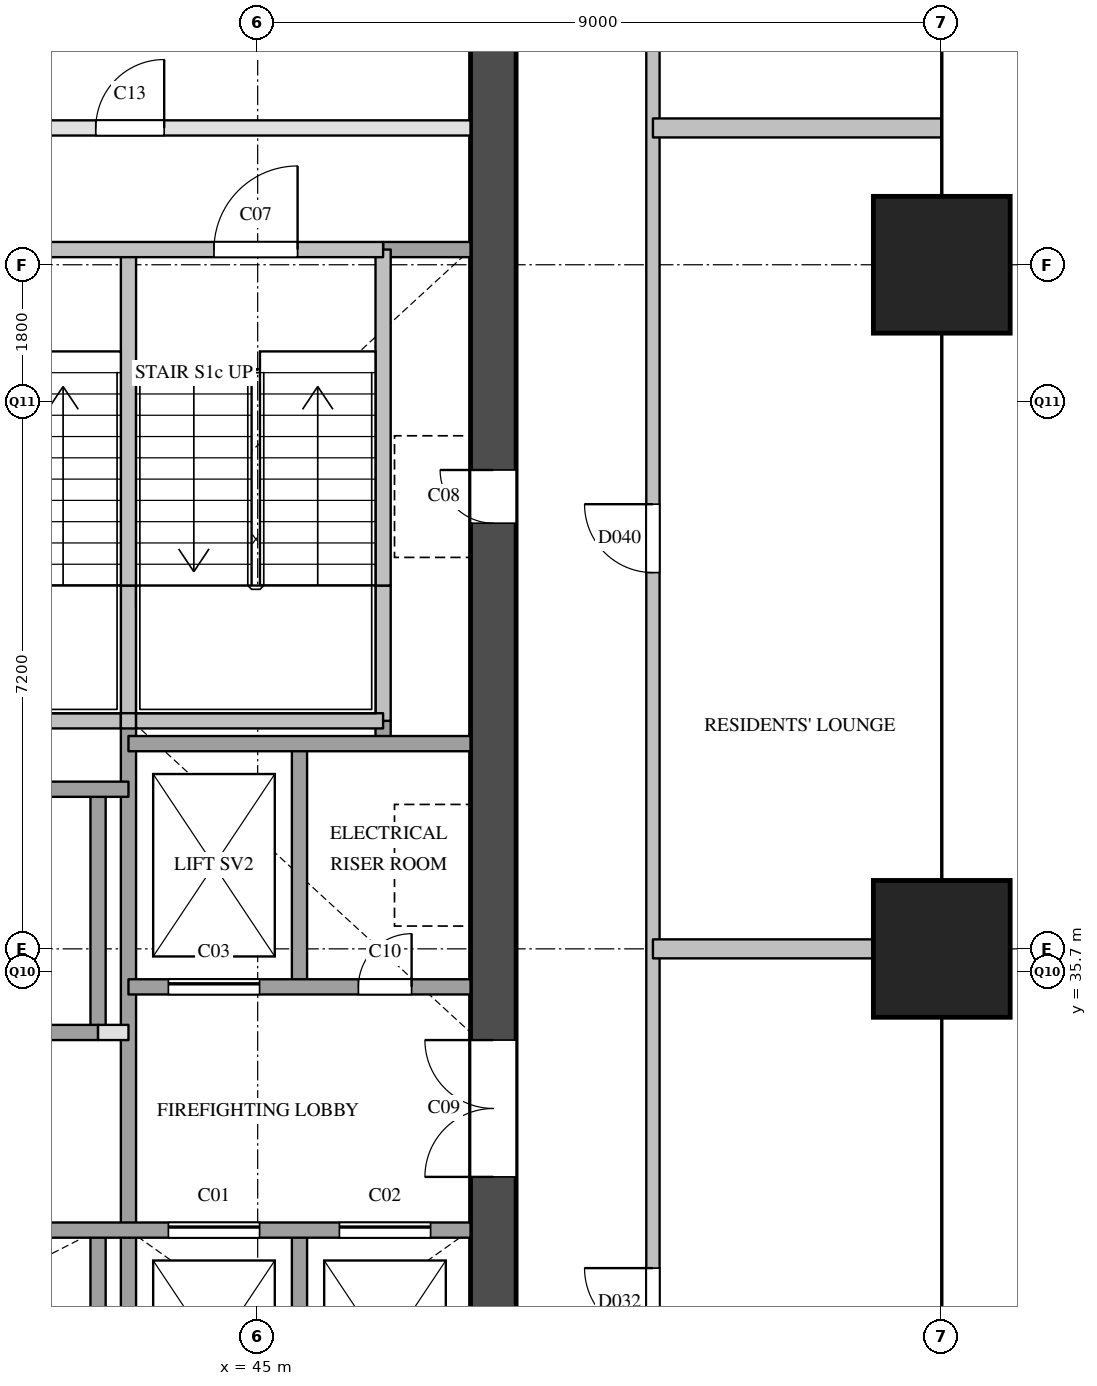
"""IFC4 building model, lengths in metres.
Left out: names, types, materials, properties, quantities, classifications, styles, units other than length and angle.
Written with IfcOpenShell. Run it as: python <this file> out.ifc"""

import sys

from ifc_helpers import new_model, si_unit, direction, frame, frame_2d, origin, origin_2d, place, context, subcontext, project, spatial, rectangle, extrude, element, fill, save


model = new_model("IFC4")
c1 = context("Model", 3, precision=1e-05, world=origin(), true_north=direction((0.0, 1.0)))
c2 = subcontext(c1, "Body", "Model", "MODEL_VIEW")
j1 = project(units=[si_unit("LENGTHUNIT", "METRE"), si_unit("PLANEANGLEUNIT", "RADIAN")], contexts=[c1])
p1 = place(None, origin())
s1 = spatial("IfcSite", under=j1, at=p1, CompositionType="ELEMENT")
p2 = place(p1, origin())
s2 = spatial("IfcBuilding", under=s1, at=p2, CompositionType="ELEMENT")
p3 = place(p2, frame((0.0, 0.0, 57.6)))
s3 = spatial("IfcBuildingStorey", under=s2, at=p3, CompositionType="ELEMENT", Elevation=57.6)
for number, where, z_axis, x_axis in (
    (1, (54.0, 36.0, 0.0), (0.0, 0.0, 1.0), (1.0, 0.0, 0.0)),
    (2, (54.0, 45.0, 0.0), (0.0, 0.0, 1.0), (1.0, 0.0, 0.0)),
):
    element("IfcColumn", number, at=place(p3, frame(where, z_axis=z_axis, x_axis=x_axis)), inside=s3, PredefinedType="COLUMN", context=c2, shape_type="SweptSolid", body=[
        extrude(rectangle(XDim=1.8, YDim=1.8, at=origin_2d()), origin(), (0.0, 0.0, 1.0), 3.8),
    ])
p4 = place(p3, frame((48.1, 29.1, 0.0), z_axis=(0.0, 0.0, 1.0), x_axis=(0.0, 1.0, 0.0)))
e3 = element("IfcWall", 3, at=p4, inside=s3, PredefinedType="SHEAR", context=c2, shape_type="SweptSolid", body=[
    extrude(rectangle(XDim=20.3, YDim=0.6, at=frame_2d((10.15, 0.0))), origin(), (0.0, 0.0, 1.0), 3.5),
])
p5 = place(p4, frame((12.5, 0.0, 0.0)))
e4 = element("IfcOpeningElement", 4, at=p5, cuts=e3, PredefinedType="OPENING", context=c2, shape_type="SweptSolid", body=[
    extrude(rectangle(XDim=0.7, YDim=2.1, at=frame_2d((0.35, 1.05))), frame((0.0, 0.31, 0.0), z_axis=(0.0, -1.0, 0.0), x_axis=(1.0, 0.0, 0.0)), (0.0, 0.0, 1.0), 0.62),
])
p6 = place(p4, frame((3.9, 0.0, 0.0)))
e5 = element("IfcOpeningElement", 5, at=p6, cuts=e3, PredefinedType="OPENING", context=c2, shape_type="SweptSolid", body=[
    extrude(rectangle(XDim=1.8, YDim=2.1, at=frame_2d((0.9, 1.05))), frame((0.0, 0.31, 0.0), z_axis=(0.0, -1.0, 0.0), x_axis=(1.0, 0.0, 0.0)), (0.0, 0.0, 1.0), 0.62),
])
p7 = place(p3, frame((42.9, 29.1, 0.0), z_axis=(0.0, 0.0, 1.0), x_axis=(0.0, 1.0, 0.0)))
e6 = element("IfcWall", 6, at=p7, inside=s3, PredefinedType="SOLIDWALL", context=c2, shape_type="SweptSolid", body=[
    extrude(rectangle(XDim=3.2, YDim=0.2, at=frame_2d((1.6, 0.0))), origin(), (0.0, 0.0, 1.0), 3.5),
])
p8 = place(p3, frame((42.9, 34.9, 0.0), z_axis=(0.0, 0.0, 1.0), x_axis=(0.0, 1.0, 0.0)))
e7 = element("IfcWall", 7, at=p8, inside=s3, PredefinedType="SOLIDWALL", context=c2, shape_type="SweptSolid", body=[
    extrude(rectangle(XDim=3.2, YDim=0.2, at=frame_2d((1.6, 0.0))), origin(), (0.0, 0.0, 1.0), 3.5),
])
p9 = place(p3, frame((43.3, 29.1, 0.0), z_axis=(0.0, 0.0, 1.0), x_axis=(0.0, 1.0, 0.0)))
e8 = element("IfcWall", 8, at=p9, inside=s3, PredefinedType="SOLIDWALL", context=c2, shape_type="SweptSolid", body=[
    extrude(rectangle(XDim=9.9, YDim=0.2, at=frame_2d((4.95, 0.0))), origin(), (0.0, 0.0, 1.0), 3.5),
])
p10 = place(p3, frame((43.3, 39.0, 0.0), z_axis=(0.0, 0.0, 1.0), x_axis=(0.0, 1.0, 0.0)))
e9 = element("IfcWall", 9, at=p10, inside=s3, PredefinedType="SOLIDWALL", context=c2, shape_type="SweptSolid", body=[
    extrude(rectangle(XDim=1.78, YDim=0.2, at=frame_2d((0.89, 0.0))), origin(), (0.0, 0.0, 1.0), 3.5),
])
p11 = place(p3, frame((43.3, 40.78, 0.0), z_axis=(0.0, 0.0, 1.0), x_axis=(0.0, 1.0, 0.0)))
e10 = element("IfcWall", 10, at=p11, inside=s3, PredefinedType="SOLIDWALL", context=c2, shape_type="SweptSolid", body=[
    extrude(rectangle(XDim=4.42, YDim=0.2, at=frame_2d((2.21, 0.0))), origin(), (0.0, 0.0, 1.0), 3.5),
])
for number, where, z_axis, x_axis in (
    (11, (45.55, 29.1, 0.0), (0.0, 0.0, 1.0), (0.0, 1.0, 0.0)),
    (12, (45.55, 35.5, 0.0), (0.0, 0.0, 1.0), (0.0, 1.0, 0.0)),
):
    element("IfcWall", number, at=place(p3, frame(where, z_axis=z_axis, x_axis=x_axis)), inside=s3, PredefinedType="SOLIDWALL", context=c2, shape_type="SweptSolid", body=[
        extrude(rectangle(XDim=3.2, YDim=0.2, at=frame_2d((1.6, 0.0))), origin(), (0.0, 0.0, 1.0), 3.5),
    ])
p12 = place(p3, frame((46.65, 38.7, 0.0), z_axis=(0.0, 0.0, 1.0), x_axis=(0.0, 1.0, 0.0)))
e13 = element("IfcWall", 13, at=p12, inside=s3, PredefinedType="SOLIDWALL", context=c2, shape_type="SweptSolid", body=[
    extrude(rectangle(XDim=0.3, YDim=0.2, at=frame_2d((0.15, 0.0))), origin(), (0.0, 0.0, 1.0), 3.5),
])
p13 = place(p3, frame((46.65, 39.0, 0.0), z_axis=(0.0, 0.0, 1.0), x_axis=(0.0, 1.0, 0.0)))
e14 = element("IfcWall", 14, at=p13, inside=s3, PredefinedType="SOLIDWALL", context=c2, shape_type="SweptSolid", body=[
    extrude(rectangle(XDim=1.78, YDim=0.2, at=frame_2d((0.89, 0.0))), origin(), (0.0, 0.0, 1.0), 3.5),
])
p14 = place(p3, frame((46.65, 40.78, 0.0), z_axis=(0.0, 0.0, 1.0), x_axis=(0.0, 1.0, 0.0)))
e15 = element("IfcWall", 15, at=p14, inside=s3, PredefinedType="SOLIDWALL", context=c2, shape_type="SweptSolid", body=[
    extrude(rectangle(XDim=4.42, YDim=0.2, at=frame_2d((2.21, 0.0))), origin(), (0.0, 0.0, 1.0), 3.5),
])
p15 = place(p3, frame((36.6, 32.3, 0.0), z_axis=(0.0, 0.0, 1.0), x_axis=(1.0, 0.0, 0.0)))
e16 = element("IfcWall", 16, at=p15, inside=s3, PredefinedType="SOLIDWALL", context=c2, shape_type="SweptSolid", body=[
    extrude(rectangle(XDim=11.2, YDim=0.2, at=frame_2d((5.6, 0.0))), origin(), (0.0, 0.0, 1.0), 3.5),
])
p16 = place(p15, frame((7.225, 0.0, 0.0)))
e17 = element("IfcOpeningElement", 17, at=p16, cuts=e16, PredefinedType="OPENING", context=c2, shape_type="SweptSolid", body=[
    extrude(rectangle(XDim=1.2, YDim=2.1, at=frame_2d((0.6, 1.05))), frame((0.0, 0.11, 0.0), z_axis=(0.0, -1.0, 0.0), x_axis=(1.0, 0.0, 0.0)), (0.0, 0.0, 1.0), 0.22),
])
p17 = place(p15, frame((9.475, 0.0, 0.0)))
e18 = element("IfcOpeningElement", 18, at=p17, cuts=e16, PredefinedType="OPENING", context=c2, shape_type="SweptSolid", body=[
    extrude(rectangle(XDim=1.2, YDim=2.1, at=frame_2d((0.6, 1.05))), frame((0.0, 0.11, 0.0), z_axis=(0.0, -1.0, 0.0), x_axis=(1.0, 0.0, 0.0)), (0.0, 0.0, 1.0), 0.22),
])
p18 = place(p3, frame((42.9, 34.9, 0.0), z_axis=(0.0, 0.0, 1.0), x_axis=(1.0, 0.0, 0.0)))
e19 = element("IfcWall", 19, at=p18, inside=s3, PredefinedType="PARTITIONING", context=c2, shape_type="SweptSolid", body=[
    extrude(rectangle(XDim=0.4, YDim=0.2, at=frame_2d((0.2, 0.0))), origin(), (0.0, 0.0, 1.0), 3.5),
])
p19 = place(p3, frame((36.6, 34.9, 0.0), z_axis=(0.0, 0.0, 1.0), x_axis=(1.0, 0.0, 0.0)))
e20 = element("IfcWall", 20, at=p19, inside=s3, PredefinedType="SOLIDWALL", context=c2, shape_type="SweptSolid", body=[
    extrude(rectangle(XDim=6.3, YDim=0.2, at=frame_2d((3.15, 0.0))), origin(), (0.0, 0.0, 1.0), 3.5),
])
p20 = place(p3, frame((43.3, 35.5, 0.0), z_axis=(0.0, 0.0, 1.0), x_axis=(1.0, 0.0, 0.0)))
e21 = element("IfcWall", 21, at=p20, inside=s3, PredefinedType="SOLIDWALL", context=c2, shape_type="SweptSolid", body=[
    extrude(rectangle(XDim=4.5, YDim=0.2, at=frame_2d((2.25, 0.0))), origin(), (0.0, 0.0, 1.0), 3.5),
])
p21 = place(p20, frame((0.525, 0.0, 0.0)))
e22 = element("IfcOpeningElement", 22, at=p21, cuts=e21, PredefinedType="OPENING", context=c2, shape_type="SweptSolid", body=[
    extrude(rectangle(XDim=1.2, YDim=2.1, at=frame_2d((0.6, 1.05))), frame((0.0, 0.11, 0.0), z_axis=(0.0, -1.0, 0.0), x_axis=(1.0, 0.0, 0.0)), (0.0, 0.0, 1.0), 0.22),
])
p22 = place(p20, frame((3.025, 0.0, 0.0)))
e23 = element("IfcOpeningElement", 23, at=p22, cuts=e21, PredefinedType="OPENING", context=c2, shape_type="SweptSolid", body=[
    extrude(rectangle(XDim=0.7, YDim=2.1, at=frame_2d((0.35, 1.05))), frame((0.0, 0.11, 0.0), z_axis=(0.0, -1.0, 0.0), x_axis=(1.0, 0.0, 0.0)), (0.0, 0.0, 1.0), 0.22),
])
p23 = place(p3, frame((36.6, 38.1, 0.0), z_axis=(0.0, 0.0, 1.0), x_axis=(1.0, 0.0, 0.0)))
e24 = element("IfcWall", 24, at=p23, inside=s3, PredefinedType="SOLIDWALL", context=c2, shape_type="SweptSolid", body=[
    extrude(rectangle(XDim=6.7, YDim=0.2, at=frame_2d((3.35, 0.0))), origin(), (0.0, 0.0, 1.0), 3.5),
])
p24 = place(p3, frame((43.3, 38.7, 0.0), z_axis=(0.0, 0.0, 1.0), x_axis=(1.0, 0.0, 0.0)))
e25 = element("IfcWall", 25, at=p24, inside=s3, PredefinedType="SOLIDWALL", context=c2, shape_type="SweptSolid", body=[
    extrude(rectangle(XDim=4.5, YDim=0.2, at=frame_2d((2.25, 0.0))), origin(), (0.0, 0.0, 1.0), 3.5),
])
p25 = place(p3, frame((40.05, 39.0, 0.0), z_axis=(0.0, 0.0, 1.0), x_axis=(1.0, 0.0, 0.0)))
e26 = element("IfcWall", 26, at=p25, inside=s3, PredefinedType="SOLIDWALL", context=c2, shape_type="SweptSolid", body=[
    extrude(rectangle(XDim=3.15, YDim=0.2, at=frame_2d((1.575, 0.0))), origin(), (0.0, 0.0, 1.0), 3.5),
])
p26 = place(p3, frame((43.2, 39.0, 0.0), z_axis=(0.0, 0.0, 1.0), x_axis=(1.0, 0.0, 0.0)))
e27 = element("IfcWall", 27, at=p26, inside=s3, PredefinedType="SOLIDWALL", context=c2, shape_type="SweptSolid", body=[
    extrude(rectangle(XDim=0.2, YDim=0.2, at=frame_2d((0.1, 0.0))), origin(), (0.0, 0.0, 1.0), 3.5),
])
p27 = place(p3, frame((43.4, 39.0, 0.0), z_axis=(0.0, 0.0, 1.0), x_axis=(1.0, 0.0, 0.0)))
e28 = element("IfcWall", 28, at=p27, inside=s3, PredefinedType="SOLIDWALL", context=c2, shape_type="SweptSolid", body=[
    extrude(rectangle(XDim=3.25, YDim=0.2, at=frame_2d((1.625, 0.0))), origin(), (0.0, 0.0, 1.0), 3.5),
])
p28 = place(p3, frame((46.65, 45.2, 0.0), z_axis=(0.0, 0.0, 1.0), x_axis=(1.0, 0.0, 0.0)))
e29 = element("IfcWall", 29, at=p28, inside=s3, PredefinedType="SOLIDWALL", context=c2, shape_type="SweptSolid", body=[
    extrude(rectangle(XDim=1.15, YDim=0.2, at=frame_2d((0.575, 0.0))), origin(), (0.0, 0.0, 1.0), 3.5),
])
p29 = place(p3, frame((36.6, 45.2, 0.0), z_axis=(0.0, 0.0, 1.0), x_axis=(1.0, 0.0, 0.0)))
e30 = element("IfcWall", 30, at=p29, inside=s3, PredefinedType="SOLIDWALL", context=c2, shape_type="SweptSolid", body=[
    extrude(rectangle(XDim=10.05, YDim=0.2, at=frame_2d((5.025, 0.0))), origin(), (0.0, 0.0, 1.0), 3.5),
])
p30 = place(p29, frame((1.125, 0.0, 0.0)))
e31 = element("IfcOpeningElement", 31, at=p30, cuts=e30, PredefinedType="OPENING", context=c2, shape_type="SweptSolid", body=[
    extrude(rectangle(XDim=1.1, YDim=2.1, at=frame_2d((0.55, 1.05))), frame((0.0, 0.11, 0.0), z_axis=(0.0, -1.0, 0.0), x_axis=(1.0, 0.0, 0.0)), (0.0, 0.0, 1.0), 0.22),
])
p31 = place(p29, frame((4.475, 0.0, 0.0)))
e32 = element("IfcOpeningElement", 32, at=p31, cuts=e30, PredefinedType="OPENING", context=c2, shape_type="SweptSolid", body=[
    extrude(rectangle(XDim=1.1, YDim=2.1, at=frame_2d((0.55, 1.05))), frame((0.0, 0.11, 0.0), z_axis=(0.0, -1.0, 0.0), x_axis=(1.0, 0.0, 0.0)), (0.0, 0.0, 1.0), 0.22),
])
p32 = place(p29, frame((7.825, 0.0, 0.0)))
e33 = element("IfcOpeningElement", 33, at=p32, cuts=e30, PredefinedType="OPENING", context=c2, shape_type="SweptSolid", body=[
    extrude(rectangle(XDim=1.1, YDim=2.1, at=frame_2d((0.55, 1.05))), frame((0.0, 0.11, 0.0), z_axis=(0.0, -1.0, 0.0), x_axis=(1.0, 0.0, 0.0)), (0.0, 0.0, 1.0), 0.22),
])
p33 = place(p3, frame((36.6, 46.8, 0.0), z_axis=(0.0, 0.0, 1.0), x_axis=(1.0, 0.0, 0.0)))
e34 = element("IfcWall", 34, at=p33, inside=s3, PredefinedType="PARTITIONING", context=c2, shape_type="SweptSolid", body=[
    extrude(rectangle(XDim=11.2, YDim=0.2, at=frame_2d((5.6, 0.0))), origin(), (0.0, 0.0, 1.0), 3.5),
])
p34 = place(p33, frame((0.67, 0.0, 0.0)))
e35 = element("IfcOpeningElement", 35, at=p34, cuts=e34, PredefinedType="OPENING", context=c2, shape_type="SweptSolid", body=[
    extrude(rectangle(XDim=0.9, YDim=2.1, at=frame_2d((0.45, 1.05))), frame((0.0, 0.11, 0.0), z_axis=(0.0, -1.0, 0.0), x_axis=(1.0, 0.0, 0.0)), (0.0, 0.0, 1.0), 0.22),
])
p35 = place(p33, frame((6.27, 0.0, 0.0)))
e36 = element("IfcOpeningElement", 36, at=p35, cuts=e34, PredefinedType="OPENING", context=c2, shape_type="SweptSolid", body=[
    extrude(rectangle(XDim=0.9, YDim=2.1, at=frame_2d((0.45, 1.05))), frame((0.0, 0.11, 0.0), z_axis=(0.0, -1.0, 0.0), x_axis=(1.0, 0.0, 0.0)), (0.0, 0.0, 1.0), 0.22),
])
p36 = place(p3, frame((50.2, 26.7, 0.0), z_axis=(0.0, 0.0, 1.0), x_axis=(0.0, 1.0, 0.0)))
e37 = element("IfcWall", 37, at=p36, inside=s3, PredefinedType="PARTITIONING", context=c2, shape_type="SweptSolid", body=[
    extrude(rectangle(XDim=25.1, YDim=0.175, at=frame_2d((12.55, 0.0))), origin(), (0.0, 0.0, 1.0), 2.5),
])
p37 = place(p36, frame((4.2, 0.0, 0.0)))
e38 = element("IfcOpeningElement", 38, at=p37, cuts=e37, PredefinedType="OPENING", context=c2, shape_type="SweptSolid", body=[
    extrude(rectangle(XDim=0.9, YDim=2.1, at=frame_2d((0.45, 1.05))), frame((0.0, 0.097, 0.0), z_axis=(0.0, -1.0, 0.0), x_axis=(1.0, 0.0, 0.0)), (0.0, 0.0, 1.0), 0.195),
])
p38 = place(p36, frame((14.25, 0.0, 0.0)))
e39 = element("IfcOpeningElement", 39, at=p38, cuts=e37, PredefinedType="OPENING", context=c2, shape_type="SweptSolid", body=[
    extrude(rectangle(XDim=0.9, YDim=2.1, at=frame_2d((0.45, 1.05))), frame((0.0, 0.097, 0.0), z_axis=(0.0, -1.0, 0.0), x_axis=(1.0, 0.0, 0.0)), (0.0, 0.0, 1.0), 0.195),
])
p39 = place(p36, frame((22.15, 0.0, 0.0)))
e40 = element("IfcOpeningElement", 40, at=p39, cuts=e37, PredefinedType="OPENING", context=c2, shape_type="SweptSolid", body=[
    extrude(rectangle(XDim=0.9, YDim=2.1, at=frame_2d((0.45, 1.05))), frame((0.0, 0.097, 0.0), z_axis=(0.0, -1.0, 0.0), x_axis=(1.0, 0.0, 0.0)), (0.0, 0.0, 1.0), 0.195),
])
p40 = place(p3, frame((50.2, 36.0, 0.0), z_axis=(0.0, 0.0, 1.0), x_axis=(1.0, 0.0, 0.0)))
e41 = element("IfcWall", 41, at=p40, inside=s3, PredefinedType="PARTITIONING", context=c2, shape_type="SweptSolid", body=[
    extrude(rectangle(XDim=3.8, YDim=0.25, at=frame_2d((1.9, 0.0))), origin(), (0.0, 0.0, 1.0), 3.5),
])
p41 = place(p3, frame((50.2, 46.8, 0.0), z_axis=(0.0, 0.0, 1.0), x_axis=(1.0, 0.0, 0.0)))
e42 = element("IfcWall", 42, at=p41, inside=s3, PredefinedType="PARTITIONING", context=c2, shape_type="SweptSolid", body=[
    extrude(rectangle(XDim=3.8, YDim=0.25, at=frame_2d((1.9, 0.0))), origin(), (0.0, 0.0, 1.0), 2.5),
])
p42 = place(p16, origin())
e43 = element("IfcDoor", 43, at=p42, inside=s3, OperationType="SLIDING_TO_LEFT", PredefinedType="DOOR", context=c2, shape_type="SweptSolid", body=[
    extrude(rectangle(XDim=1.2, YDim=2.1, at=frame_2d((0.6, 1.05))), frame((0.0, 0.025, 0.0), z_axis=(0.0, -1.0, 0.0), x_axis=(1.0, 0.0, 0.0)), (0.0, 0.0, 1.0), 0.05),
])
fill(e17, e43)
p43 = place(p17, origin())
e44 = element("IfcDoor", 44, at=p43, inside=s3, OperationType="SLIDING_TO_LEFT", PredefinedType="DOOR", context=c2, shape_type="SweptSolid", body=[
    extrude(rectangle(XDim=1.2, YDim=2.1, at=frame_2d((0.6, 1.05))), frame((0.0, 0.025, 0.0), z_axis=(0.0, -1.0, 0.0), x_axis=(1.0, 0.0, 0.0)), (0.0, 0.0, 1.0), 0.05),
])
fill(e18, e44)
p44 = place(p21, origin())
e45 = element("IfcDoor", 45, at=p44, inside=s3, OperationType="SLIDING_TO_LEFT", PredefinedType="DOOR", context=c2, shape_type="SweptSolid", body=[
    extrude(rectangle(XDim=1.2, YDim=2.1, at=frame_2d((0.6, 1.05))), frame((0.0, 0.025, 0.0), z_axis=(0.0, -1.0, 0.0), x_axis=(1.0, 0.0, 0.0)), (0.0, 0.0, 1.0), 0.05),
])
fill(e22, e45)
p45 = place(p32, origin())
e46 = element("IfcDoor", 46, at=p45, inside=s3, OperationType="SINGLE_SWING_RIGHT", PredefinedType="DOOR", context=c2, shape_type="SweptSolid", body=[
    extrude(rectangle(XDim=1.1, YDim=2.1, at=frame_2d((0.55, 1.05))), frame((0.0, 0.025, 0.0), z_axis=(0.0, -1.0, 0.0), x_axis=(1.0, 0.0, 0.0)), (0.0, 0.0, 1.0), 0.05),
])
fill(e33, e46)
p46 = place(p5, origin())
e47 = element("IfcDoor", 47, at=p46, inside=s3, OperationType="SINGLE_SWING_RIGHT", PredefinedType="DOOR", context=c2, shape_type="SweptSolid", body=[
    extrude(rectangle(XDim=0.7, YDim=2.1, at=frame_2d((0.35, 1.05))), frame((0.0, 0.025, 0.0), z_axis=(0.0, -1.0, 0.0), x_axis=(1.0, 0.0, 0.0)), (0.0, 0.0, 1.0), 0.05),
])
fill(e4, e47)
p47 = place(p6, origin())
e48 = element("IfcDoor", 48, at=p47, inside=s3, OperationType="DOUBLE_DOOR_SINGLE_SWING", PredefinedType="DOOR", context=c2, shape_type="SweptSolid", body=[
    extrude(rectangle(XDim=1.8, YDim=2.1, at=frame_2d((0.9, 1.05))), frame((0.0, 0.025, 0.0), z_axis=(0.0, -1.0, 0.0), x_axis=(1.0, 0.0, 0.0)), (0.0, 0.0, 1.0), 0.05),
])
fill(e5, e48)
p48 = place(p22, origin())
e49 = element("IfcDoor", 49, at=p48, inside=s3, OperationType="SINGLE_SWING_RIGHT", PredefinedType="DOOR", context=c2, shape_type="SweptSolid", body=[
    extrude(rectangle(XDim=0.7, YDim=2.1, at=frame_2d((0.35, 1.05))), frame((0.0, 0.025, 0.0), z_axis=(0.0, -1.0, 0.0), x_axis=(1.0, 0.0, 0.0)), (0.0, 0.0, 1.0), 0.05),
])
fill(e23, e49)
p49 = place(p35, origin())
e50 = element("IfcDoor", 50, at=p49, inside=s3, OperationType="SINGLE_SWING_RIGHT", PredefinedType="DOOR", context=c2, shape_type="SweptSolid", body=[
    extrude(rectangle(XDim=0.9, YDim=2.1, at=frame_2d((0.45, 1.05))), frame((0.0, 0.025, 0.0), z_axis=(0.0, -1.0, 0.0), x_axis=(1.0, 0.0, 0.0)), (0.0, 0.0, 1.0), 0.05),
])
fill(e36, e50)
p50 = place(p37, origin())
e51 = element("IfcDoor", 51, at=p50, inside=s3, OperationType="SINGLE_SWING_RIGHT", PredefinedType="DOOR", context=c2, shape_type="SweptSolid", body=[
    extrude(rectangle(XDim=0.9, YDim=2.1, at=frame_2d((0.45, 1.05))), frame((0.0, 0.025, 0.0), z_axis=(0.0, -1.0, 0.0), x_axis=(1.0, 0.0, 0.0)), (0.0, 0.0, 1.0), 0.05),
])
fill(e38, e51)
p51 = place(p38, origin())
e52 = element("IfcDoor", 52, at=p51, inside=s3, OperationType="SINGLE_SWING_RIGHT", PredefinedType="DOOR", context=c2, shape_type="SweptSolid", body=[
    extrude(rectangle(XDim=0.9, YDim=2.1, at=frame_2d((0.45, 1.05))), frame((0.0, 0.025, 0.0), z_axis=(0.0, -1.0, 0.0), x_axis=(1.0, 0.0, 0.0)), (0.0, 0.0, 1.0), 0.05),
])
fill(e39, e52)
save(model, sys.argv[1])
